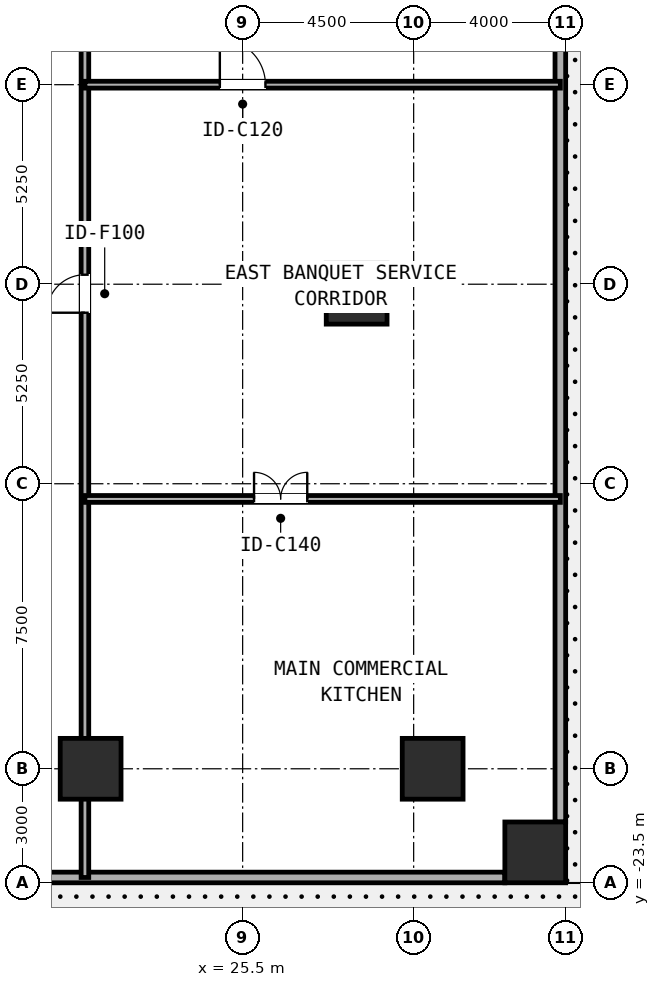
"""IFC4 building model, lengths in metres.
Left out: names, types, materials, properties, quantities, classifications, styles, units other than length and angle.
Written with IfcOpenShell. Run it as: python <this file> out.ifc"""

import sys

from ifc_helpers import new_model, si_unit, direction, frame, frame_2d, origin, origin_2d, place, context, subcontext, project, spatial, rectangle, extrude, element, fill, save


model = new_model("IFC4")
c1 = context("Model", 3, precision=1e-05, world=origin(), true_north=direction((0.0, 1.0)))
c2 = subcontext(c1, "Body", "Model", "MODEL_VIEW")
j1 = project(units=[si_unit("LENGTHUNIT", "METRE"), si_unit("PLANEANGLEUNIT", "RADIAN")], contexts=[c1])
p1 = place(None, origin())
s1 = spatial("IfcSite", under=j1, at=p1, CompositionType="ELEMENT")
p2 = place(p1, origin())
s2 = spatial("IfcBuilding", under=s1, at=p2, CompositionType="ELEMENT")
p3 = place(p2, origin())
s3 = spatial("IfcBuildingStorey", under=s2, at=p3, CompositionType="ELEMENT", Elevation=0.0)
for number, where, z_axis, x_axis in (
    (1, (33.2, -22.7, 0.0), (0.0, 0.0, 1.0), (1.0, 0.0, 0.0)),
    (2, (21.5, -20.5, 0.0), (0.0, 0.0, 1.0), (1.0, 0.0, 0.0)),
    (3, (30.5, -20.5, 0.0), (0.0, 0.0, 1.0), (1.0, 0.0, 0.0)),
    (4, (28.5, -8.0, 0.0), (0.0, 0.0, 1.0), (1.0, 0.0, 0.0)),
):
    element("IfcColumn", number, at=place(p3, frame(where, z_axis=z_axis, x_axis=x_axis)), inside=s3, PredefinedType="COLUMN", context=c2, shape_type="SweptSolid", body=[
        extrude(rectangle(XDim=1.6, YDim=1.6, at=origin_2d()), origin(), (0.0, 0.0, 1.0), 5.4),
    ])
p4 = place(p3, frame((-32.4, -23.36, 0.0), z_axis=(0.0, 0.0, 1.0), x_axis=(1.0, 0.0, 0.0)))
e5 = element("IfcWall", 5, at=p4, inside=s3, PredefinedType="STANDARD", context=c2, shape_type="SweptSolid", body=[
    extrude(rectangle(XDim=64.8, YDim=0.28, at=frame_2d((32.4, 0.0))), origin(), (0.0, 0.0, 1.0), 5.1),
])
p5 = place(p4, frame((16.9, 0.0, 0.0)))
e6 = element("IfcOpeningElement", 6, at=p5, cuts=e5, PredefinedType="OPENING", context=c2, shape_type="SweptSolid", body=[
    extrude(rectangle(XDim=2.0, YDim=2.35, at=frame_2d((1.0, 1.175))), frame((0.0, 0.15, 0.0), z_axis=(0.0, -1.0, 0.0), x_axis=(1.0, 0.0, 0.0)), (0.0, 0.0, 1.0), 0.3),
])
p6 = place(p4, frame((45.9, 0.0, 0.0)))
e7 = element("IfcOpeningElement", 7, at=p6, cuts=e5, PredefinedType="OPENING", context=c2, shape_type="SweptSolid", body=[
    extrude(rectangle(XDim=2.0, YDim=2.35, at=frame_2d((1.0, 1.175))), frame((0.0, 0.15, 0.0), z_axis=(0.0, -1.0, 0.0), x_axis=(1.0, 0.0, 0.0)), (0.0, 0.0, 1.0), 0.3),
])
p7 = place(p3, frame((33.86, -21.9, 0.0), z_axis=(0.0, 0.0, 1.0), x_axis=(0.0, 1.0, 0.0)))
e8 = element("IfcWall", 8, at=p7, inside=s3, PredefinedType="STANDARD", context=c2, shape_type="SweptSolid", body=[
    extrude(rectangle(XDim=43.8, YDim=0.28, at=frame_2d((21.9, 0.0))), origin(), (0.0, 0.0, 1.0), 5.1),
])
p8 = place(p7, frame((23.9, 0.0, 0.0)))
e9 = element("IfcOpeningElement", 9, at=p8, cuts=e8, PredefinedType="OPENING", context=c2, shape_type="SweptSolid", body=[
    extrude(rectangle(XDim=2.0, YDim=2.35, at=frame_2d((1.0, 1.175))), frame((0.0, 0.15, 0.0), z_axis=(0.0, -1.0, 0.0), x_axis=(1.0, 0.0, 0.0)), (0.0, 0.0, 1.0), 0.3),
])
p9 = place(p7, frame((32.9, 0.0, 0.0)))
e10 = element("IfcOpeningElement", 10, at=p9, cuts=e8, PredefinedType="OPENING", context=c2, shape_type="SweptSolid", body=[
    extrude(rectangle(XDim=2.0, YDim=2.35, at=frame_2d((1.0, 1.175))), frame((0.0, 0.15, 0.0), z_axis=(0.0, -1.0, 0.0), x_axis=(1.0, 0.0, 0.0)), (0.0, 0.0, 1.0), 0.3),
])
p10 = place(p7, frame((41.0, 0.0, 0.0)))
e11 = element("IfcOpeningElement", 11, at=p10, cuts=e8, PredefinedType="OPENING", context=c2, shape_type="SweptSolid", body=[
    extrude(rectangle(XDim=2.0, YDim=2.35, at=frame_2d((1.0, 1.175))), frame((0.0, 0.15, 0.0), z_axis=(0.0, -1.0, 0.0), x_axis=(1.0, 0.0, 0.0)), (0.0, 0.0, 1.0), 0.3),
])
p11 = place(p3, frame((21.35, -23.36, 0.0), z_axis=(0.0, 0.0, 1.0), x_axis=(0.0, 1.0, 0.0)))
e12 = element("IfcWall", 12, at=p11, inside=s3, PredefinedType="PARTITIONING", context=c2, shape_type="SweptSolid", body=[
    extrude(rectangle(XDim=23.06, YDim=0.2, at=frame_2d((11.53, 0.0))), origin(), (0.0, 0.0, 1.0), 4.229),
])
p12 = place(p11, frame((14.86, 0.0, 0.0)))
e13 = element("IfcOpeningElement", 13, at=p12, cuts=e12, PredefinedType="OPENING", context=c2, shape_type="SweptSolid", body=[
    extrude(rectangle(XDim=1.0, YDim=2.1, at=frame_2d((0.5, 1.05))), frame((0.0, 0.11, 0.0), z_axis=(0.0, -1.0, 0.0), x_axis=(1.0, 0.0, 0.0)), (0.0, 0.0, 1.0), 0.22),
])
p13 = place(p3, frame((21.35, -2.5, 0.0), z_axis=(0.0, 0.0, 1.0), x_axis=(1.0, 0.0, 0.0)))
e14 = element("IfcWall", 14, at=p13, inside=s3, PredefinedType="PARTITIONING", context=c2, shape_type="SweptSolid", body=[
    extrude(rectangle(XDim=12.51, YDim=0.18, at=frame_2d((6.255, 0.0))), origin(), (0.0, 0.0, 1.0), 4.229),
])
p14 = place(p13, frame((3.55, 0.0, 0.0)))
e15 = element("IfcOpeningElement", 15, at=p14, cuts=e14, PredefinedType="OPENING", context=c2, shape_type="SweptSolid", body=[
    extrude(rectangle(XDim=1.2, YDim=2.2, at=frame_2d((0.6, 1.1))), frame((0.0, 0.1, 0.0), z_axis=(0.0, -1.0, 0.0), x_axis=(1.0, 0.0, 0.0)), (0.0, 0.0, 1.0), 0.2),
])
p15 = place(p3, frame((21.35, -13.4, 0.0), z_axis=(0.0, 0.0, 1.0), x_axis=(1.0, 0.0, 0.0)))
e16 = element("IfcWall", 16, at=p15, inside=s3, PredefinedType="PARTITIONING", context=c2, shape_type="SweptSolid", body=[
    extrude(rectangle(XDim=12.51, YDim=0.18, at=frame_2d((6.255, 0.0))), origin(), (0.0, 0.0, 1.0), 4.229),
])
p16 = place(p15, frame((4.45, 0.0, 0.0)))
e17 = element("IfcOpeningElement", 17, at=p16, cuts=e16, PredefinedType="OPENING", context=c2, shape_type="SweptSolid", body=[
    extrude(rectangle(XDim=1.4, YDim=2.2, at=frame_2d((0.7, 1.1))), frame((0.0, 0.1, 0.0), z_axis=(0.0, -1.0, 0.0), x_axis=(1.0, 0.0, 0.0)), (0.0, 0.0, 1.0), 0.2),
])
p17 = place(p14, origin())
e18 = element("IfcDoor", 18, at=p17, inside=s3, OperationType="SINGLE_SWING_LEFT", PredefinedType="DOOR", context=c2, shape_type="SweptSolid", body=[
    extrude(rectangle(XDim=1.2, YDim=2.2, at=frame_2d((0.6, 1.1))), frame((0.0, 0.025, 0.0), z_axis=(0.0, -1.0, 0.0), x_axis=(1.0, 0.0, 0.0)), (0.0, 0.0, 1.0), 0.05),
])
fill(e15, e18)
p18 = place(p12, frame((1.0, 0.0, 0.0), z_axis=(0.0, 0.0, 1.0), x_axis=(-1.0, 0.0, 0.0)))
e19 = element("IfcDoor", 19, at=p18, inside=s3, OperationType="SINGLE_SWING_LEFT", PredefinedType="DOOR", context=c2, shape_type="SweptSolid", body=[
    extrude(rectangle(XDim=1.0, YDim=2.1, at=frame_2d((0.5, 1.05))), frame((0.0, 0.025, 0.0), z_axis=(0.0, -1.0, 0.0), x_axis=(1.0, 0.0, 0.0)), (0.0, 0.0, 1.0), 0.05),
])
fill(e13, e19)
p19 = place(p16, origin())
e20 = element("IfcDoor", 20, at=p19, inside=s3, OperationType="DOUBLE_DOOR_SINGLE_SWING", PredefinedType="DOOR", context=c2, shape_type="SweptSolid", body=[
    extrude(rectangle(XDim=1.4, YDim=2.2, at=frame_2d((0.7, 1.1))), frame((0.0, 0.025, 0.0), z_axis=(0.0, -1.0, 0.0), x_axis=(1.0, 0.0, 0.0)), (0.0, 0.0, 1.0), 0.05),
])
fill(e17, e20)
save(model, sys.argv[1])
